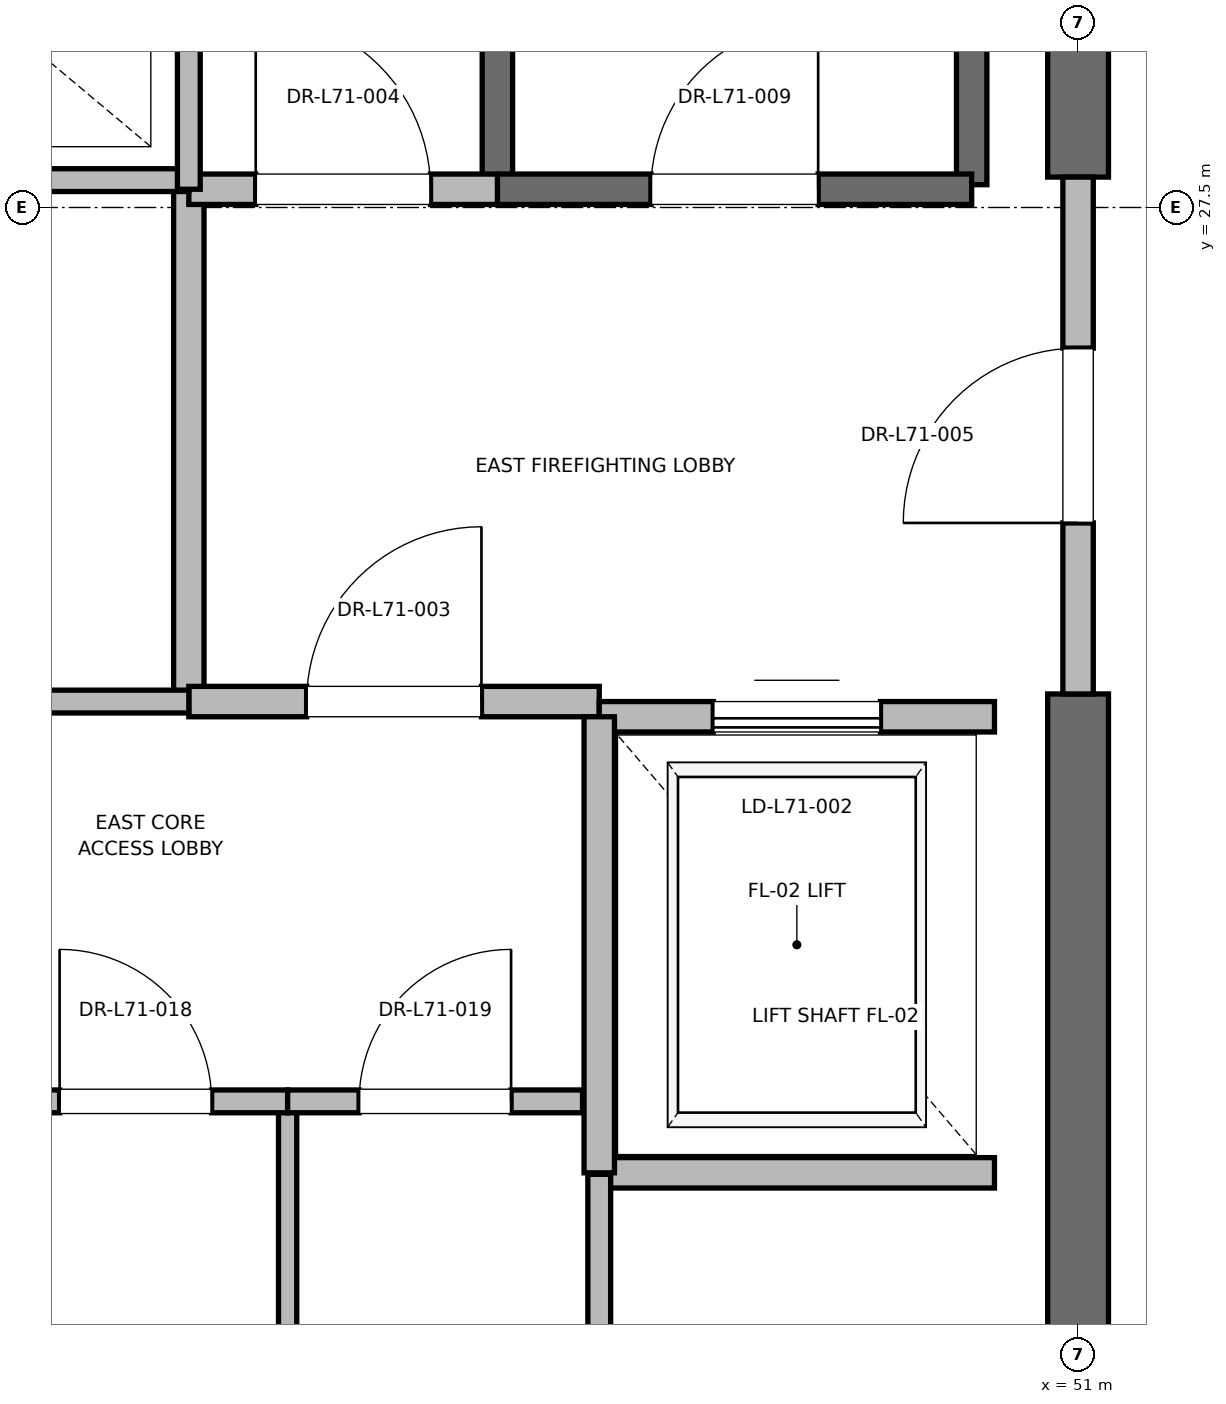
"""IFC4 building model, lengths in metres.
Left out: names, types, materials, properties, quantities, classifications, styles, units other than length and angle.
Written with IfcOpenShell. Run it as: python <this file> out.ifc"""

import sys

from ifc_helpers import new_model, si_unit, direction, frame, frame_2d, origin, place, context, subcontext, project, spatial, rectangle, extrude, element, fill, save


model = new_model("IFC4")
c1 = context("Model", 3, precision=1e-05, world=origin(), true_north=direction((0.0, 1.0)))
c2 = subcontext(c1, "Body", "Model", "MODEL_VIEW")
j1 = project(units=[si_unit("LENGTHUNIT", "METRE"), si_unit("PLANEANGLEUNIT", "RADIAN")], contexts=[c1])
p1 = place(None, origin())
s1 = spatial("IfcSite", under=j1, at=p1, CompositionType="ELEMENT")
p2 = place(p1, origin())
s2 = spatial("IfcBuilding", under=s1, at=p2, CompositionType="ELEMENT")
p3 = place(p2, frame((0.0, 0.0, 306.8)))
s3 = spatial("IfcBuildingStorey", under=s2, at=p3, CompositionType="ELEMENT", Elevation=306.8)
p4 = place(p3, frame((51.0, 18.5, 0.0), z_axis=(0.0, 0.0, 1.0), x_axis=(0.0, 1.0, 0.0)))
e1 = element("IfcWall", 1, at=p4, inside=s3, PredefinedType="SHEAR", context=c2, shape_type="SweptSolid", body=[
    extrude(rectangle(XDim=5.8, YDim=0.4, at=frame_2d((2.9, 0.0))), origin(), (0.0, 0.0, 1.0), 3.785),
])
p5 = place(p3, frame((51.0, 27.7, 0.0), z_axis=(0.0, 0.0, 1.0), x_axis=(0.0, 1.0, 0.0)))
e2 = element("IfcWall", 2, at=p5, inside=s3, PredefinedType="SHEAR", context=c2, shape_type="SweptSolid", body=[
    extrude(rectangle(XDim=8.8, YDim=0.4, at=frame_2d((4.4, 0.0))), origin(), (0.0, 0.0, 1.0), 3.785),
])
p6 = place(p3, frame((50.3, 27.65, 0.0), z_axis=(0.0, 0.0, 1.0), x_axis=(0.0, 1.0, 0.0)))
e3 = element("IfcWall", 3, at=p6, inside=s3, PredefinedType="SOLIDWALL", context=c2, shape_type="SweptSolid", body=[
    extrude(rectangle(XDim=8.15, YDim=0.2, at=frame_2d((4.075, 0.0))), origin(), (0.0, 0.0, 1.0), 3.785),
])
p7 = place(p3, frame((47.18, 27.62, 0.0), z_axis=(0.0, 0.0, 1.0), x_axis=(0.0, 1.0, 0.0)))
e4 = element("IfcWall", 4, at=p7, inside=s3, PredefinedType="SOLIDWALL", context=c2, shape_type="SweptSolid", body=[
    extrude(rectangle(XDim=8.18, YDim=0.2, at=frame_2d((4.09, 0.0))), origin(), (0.0, 0.0, 1.0), 3.785),
])
p8 = place(p3, frame((47.18, 27.62, 0.0), z_axis=(0.0, 0.0, 1.0), x_axis=(1.0, 0.0, 0.0)))
e5 = element("IfcWall", 5, at=p8, inside=s3, PredefinedType="SOLIDWALL", context=c2, shape_type="SweptSolid", body=[
    extrude(rectangle(XDim=3.12, YDim=0.2, at=frame_2d((1.56, 0.0))), origin(), (0.0, 0.0, 1.0), 3.785),
])
p9 = place(p8, frame((1.01, 0.0, 0.0)))
e6 = element("IfcOpeningElement", 6, at=p9, cuts=e5, PredefinedType="OPENING", context=c2, shape_type="SweptSolid", body=[
    extrude(rectangle(XDim=1.1, YDim=2.15, at=frame_2d((0.55, 1.075))), frame((0.0, 0.1, 0.0), z_axis=(0.0, -1.0, 0.0), x_axis=(1.0, 0.0, 0.0)), (0.0, 0.0, 1.0), 0.2),
])
p10 = place(p3, frame((45.15, 24.25, 0.0), z_axis=(0.0, 0.0, 1.0), x_axis=(0.0, 1.0, 0.0)))
e7 = element("IfcWall", 7, at=p10, inside=s3, PredefinedType="PARTITIONING", context=c2, shape_type="SweptSolid", body=[
    extrude(rectangle(XDim=3.37, YDim=0.2, at=frame_2d((1.685, 0.0))), origin(), (0.0, 0.0, 1.0), 3.785),
])
p11 = place(p3, frame((45.15, 24.25, 0.0), z_axis=(0.0, 0.0, 1.0), x_axis=(1.0, 0.0, 0.0)))
e8 = element("IfcWall", 8, at=p11, inside=s3, PredefinedType="PARTITIONING", context=c2, shape_type="SweptSolid", body=[
    extrude(rectangle(XDim=2.7, YDim=0.2, at=frame_2d((1.35, 0.0))), origin(), (0.0, 0.0, 1.0), 3.785),
])
p12 = place(p11, frame((0.775, 0.0, 0.0)))
e9 = element("IfcOpeningElement", 9, at=p12, cuts=e8, PredefinedType="OPENING", context=c2, shape_type="SweptSolid", body=[
    extrude(rectangle(XDim=1.15, YDim=2.2, at=frame_2d((0.575, 1.1))), frame((0.0, 0.1, 0.0), z_axis=(0.0, -1.0, 0.0), x_axis=(1.0, 0.0, 0.0)), (0.0, 0.0, 1.0), 0.2),
])
p13 = place(p3, frame((45.15, 27.62, 0.0), z_axis=(0.0, 0.0, 1.0), x_axis=(1.0, 0.0, 0.0)))
e10 = element("IfcWall", 10, at=p13, inside=s3, PredefinedType="PARTITIONING", context=c2, shape_type="SweptSolid", body=[
    extrude(rectangle(XDim=2.03, YDim=0.2, at=frame_2d((1.015, 0.0))), origin(), (0.0, 0.0, 1.0), 3.785),
])
p14 = place(p13, frame((0.44, 0.0, 0.0)))
e11 = element("IfcOpeningElement", 11, at=p14, cuts=e10, PredefinedType="OPENING", context=c2, shape_type="SweptSolid", body=[
    extrude(rectangle(XDim=1.15, YDim=2.2, at=frame_2d((0.575, 1.1))), frame((0.0, 0.1, 0.0), z_axis=(0.0, -1.0, 0.0), x_axis=(1.0, 0.0, 0.0)), (0.0, 0.0, 1.0), 0.2),
])
p15 = place(p3, frame((51.0, 24.3, 0.0), z_axis=(0.0, 0.0, 1.0), x_axis=(0.0, 1.0, 0.0)))
e12 = element("IfcWall", 12, at=p15, inside=s3, PredefinedType="PARTITIONING", context=c2, shape_type="SweptSolid", body=[
    extrude(rectangle(XDim=3.4, YDim=0.2, at=frame_2d((1.7, 0.0))), origin(), (0.0, 0.0, 1.0), 2.865),
])
p16 = place(p15, frame((1.125, 0.0, 0.0)))
e13 = element("IfcOpeningElement", 13, at=p16, cuts=e12, PredefinedType="OPENING", context=c2, shape_type="SweptSolid", body=[
    extrude(rectangle(XDim=1.15, YDim=2.2, at=frame_2d((0.575, 1.1))), frame((0.0, 0.1, 0.0), z_axis=(0.0, -1.0, 0.0), x_axis=(1.0, 0.0, 0.0)), (0.0, 0.0, 1.0), 0.2),
])
p17 = place(p3, frame((47.85, 21.15, 0.0), z_axis=(0.0, 0.0, 1.0), x_axis=(1.0, 0.0, 0.0)))
e14 = element("IfcWall", 14, at=p17, inside=s3, PredefinedType="SOLIDWALL", context=c2, shape_type="SweptSolid", body=[
    extrude(rectangle(XDim=2.6, YDim=0.2, at=frame_2d((1.3, 0.0))), origin(), (0.0, 0.0, 1.0), 3.785),
])
p18 = place(p3, frame((50.45, 24.15, 0.0), z_axis=(0.0, 0.0, 1.0), x_axis=(-1.0, 0.0, 0.0)))
e15 = element("IfcWall", 15, at=p18, inside=s3, PredefinedType="SOLIDWALL", context=c2, shape_type="SweptSolid", body=[
    extrude(rectangle(XDim=2.6, YDim=0.2, at=frame_2d((1.3, 0.0))), origin(), (0.0, 0.0, 1.0), 2.865),
])
p19 = place(p18, frame((0.75, 0.0, 0.0)))
e16 = element("IfcOpeningElement", 16, at=p19, cuts=e15, PredefinedType="OPENING", context=c2, shape_type="SweptSolid", body=[
    extrude(rectangle(XDim=1.1, YDim=2.2, at=frame_2d((0.55, 1.1))), frame((0.0, 0.1, 0.0), z_axis=(0.0, -1.0, 0.0), x_axis=(1.0, 0.0, 0.0)), (0.0, 0.0, 1.0), 0.2),
])
p20 = place(p3, frame((47.85, 24.15, 0.0), z_axis=(0.0, 0.0, 1.0), x_axis=(0.0, -1.0, 0.0)))
e17 = element("IfcWall", 17, at=p20, inside=s3, PredefinedType="SOLIDWALL", context=c2, shape_type="SweptSolid", body=[
    extrude(rectangle(XDim=3.0, YDim=0.2, at=frame_2d((1.5, 0.0))), origin(), (0.0, 0.0, 1.0), 3.785),
])
p21 = place(p3, frame((41.56, 27.68, 0.0), z_axis=(0.0, 0.0, 1.0), x_axis=(1.0, 0.0, 0.0)))
e18 = element("IfcWall", 18, at=p21, inside=s3, PredefinedType="PARTITIONING", context=c2, shape_type="SweptSolid", body=[
    extrude(rectangle(XDim=3.59, YDim=0.15, at=frame_2d((1.795, 0.0))), origin(), (0.0, 0.0, 1.0), 2.85),
])
p22 = place(p3, frame((47.85, 18.6, 0.0), z_axis=(0.0, 0.0, 1.0), x_axis=(0.0, 1.0, 0.0)))
e19 = element("IfcWall", 19, at=p22, inside=s3, PredefinedType="PARTITIONING", context=c2, shape_type="SweptSolid", body=[
    extrude(rectangle(XDim=2.54, YDim=0.15, at=frame_2d((1.27, 0.0))), origin(), (0.0, 0.0, 1.0), 2.85),
])
p23 = place(p3, frame((45.8, 18.6, 0.0), z_axis=(0.0, 0.0, 1.0), x_axis=(0.0, 1.0, 0.0)))
e20 = element("IfcWall", 20, at=p23, inside=s3, PredefinedType="PARTITIONING", context=c2, shape_type="SweptSolid", body=[
    extrude(rectangle(XDim=3.02, YDim=0.12, at=frame_2d((1.51, 0.0))), origin(), (0.0, 0.0, 1.0), 2.85),
])
p24 = place(p3, frame((43.8, 21.62, 0.0), z_axis=(0.0, 0.0, 1.0), x_axis=(1.0, 0.0, 0.0)))
e21 = element("IfcWall", 21, at=p24, inside=s3, PredefinedType="PARTITIONING", context=c2, shape_type="SweptSolid", body=[
    extrude(rectangle(XDim=2.0, YDim=0.15, at=frame_2d((1.0, 0.0))), origin(), (0.0, 0.0, 1.0), 2.85),
])
p25 = place(p24, frame((0.5, 0.0, 0.0)))
e22 = element("IfcOpeningElement", 22, at=p25, cuts=e21, PredefinedType="OPENING", context=c2, shape_type="SweptSolid", body=[
    extrude(rectangle(XDim=1.0, YDim=2.15, at=frame_2d((0.5, 1.075))), frame((0.0, 0.075, 0.0), z_axis=(0.0, -1.0, 0.0), x_axis=(1.0, 0.0, 0.0)), (0.0, 0.0, 1.0), 0.15),
])
p26 = place(p3, frame((45.8, 21.62, 0.0), z_axis=(0.0, 0.0, 1.0), x_axis=(1.0, 0.0, 0.0)))
e23 = element("IfcWall", 23, at=p26, inside=s3, PredefinedType="PARTITIONING", context=c2, shape_type="SweptSolid", body=[
    extrude(rectangle(XDim=1.94, YDim=0.15, at=frame_2d((0.97, 0.0))), origin(), (0.0, 0.0, 1.0), 2.85),
])
p27 = place(p26, frame((0.47, 0.0, 0.0)))
e24 = element("IfcOpeningElement", 24, at=p27, cuts=e23, PredefinedType="OPENING", context=c2, shape_type="SweptSolid", body=[
    extrude(rectangle(XDim=1.0, YDim=2.15, at=frame_2d((0.5, 1.075))), frame((0.0, 0.075, 0.0), z_axis=(0.0, -1.0, 0.0), x_axis=(1.0, 0.0, 0.0)), (0.0, 0.0, 1.0), 0.15),
])
p28 = place(p3, frame((41.76, 24.25, 0.0), z_axis=(0.0, 0.0, 1.0), x_axis=(1.0, 0.0, 0.0)))
e25 = element("IfcWall", 25, at=p28, inside=s3, PredefinedType="PARTITIONING", context=c2, shape_type="SweptSolid", body=[
    extrude(rectangle(XDim=3.39, YDim=0.15, at=frame_2d((1.695, 0.0))), origin(), (0.0, 0.0, 1.0), 2.85),
])
p29 = place(p28, frame((1.255, 0.0, 0.0)))
e26 = element("IfcOpeningElement", 26, at=p29, cuts=e25, PredefinedType="OPENING", context=c2, shape_type="SweptSolid", body=[
    extrude(rectangle(XDim=0.88, YDim=2.1, at=frame_2d((0.44, 1.05))), frame((0.0, 0.075, 0.0), z_axis=(0.0, -1.0, 0.0), x_axis=(1.0, 0.0, 0.0)), (0.0, 0.0, 1.0), 0.15),
])
p30 = place(p3, frame((45.15, 27.62, 0.0), z_axis=(0.0, 0.0, 1.0), x_axis=(0.0, 1.0, 0.0)))
e27 = element("IfcWall", 27, at=p30, inside=s3, PredefinedType="PARTITIONING", context=c2, shape_type="SweptSolid", body=[
    extrude(rectangle(XDim=3.1, YDim=0.15, at=frame_2d((1.55, 0.0))), origin(), (0.0, 0.0, 1.0), 2.85),
])
p31 = place(p9, origin())
e28 = element("IfcDoor", 28, at=p31, inside=s3, OperationType="SINGLE_SWING_RIGHT", PredefinedType="DOOR", context=c2, shape_type="SweptSolid", body=[
    extrude(rectangle(XDim=1.1, YDim=2.15, at=frame_2d((0.55, 1.075))), frame((0.0, 0.025, 0.0), z_axis=(0.0, -1.0, 0.0), x_axis=(1.0, 0.0, 0.0)), (0.0, 0.0, 1.0), 0.05),
])
fill(e6, e28)
p32 = place(p12, origin())
e29 = element("IfcDoor", 29, at=p32, inside=s3, OperationType="SINGLE_SWING_RIGHT", PredefinedType="DOOR", context=c2, shape_type="SweptSolid", body=[
    extrude(rectangle(XDim=1.15, YDim=2.2, at=frame_2d((0.575, 1.1))), frame((0.0, 0.025, 0.0), z_axis=(0.0, -1.0, 0.0), x_axis=(1.0, 0.0, 0.0)), (0.0, 0.0, 1.0), 0.05),
])
fill(e9, e29)
p33 = place(p14, origin())
e30 = element("IfcDoor", 30, at=p33, inside=s3, OperationType="SINGLE_SWING_LEFT", PredefinedType="DOOR", context=c2, shape_type="SweptSolid", body=[
    extrude(rectangle(XDim=1.15, YDim=2.2, at=frame_2d((0.575, 1.1))), frame((0.0, 0.025, 0.0), z_axis=(0.0, -1.0, 0.0), x_axis=(1.0, 0.0, 0.0)), (0.0, 0.0, 1.0), 0.05),
])
fill(e11, e30)
p34 = place(p16, origin())
e31 = element("IfcDoor", 31, at=p34, inside=s3, OperationType="SINGLE_SWING_LEFT", PredefinedType="DOOR", context=c2, shape_type="SweptSolid", body=[
    extrude(rectangle(XDim=1.15, YDim=2.2, at=frame_2d((0.575, 1.1))), frame((0.0, 0.025, 0.0), z_axis=(0.0, -1.0, 0.0), x_axis=(1.0, 0.0, 0.0)), (0.0, 0.0, 1.0), 0.05),
])
fill(e13, e31)
p35 = place(p19, origin())
e32 = element("IfcDoor", 32, at=p35, inside=s3, OperationType="SLIDING_TO_RIGHT", PredefinedType="DOOR", context=c2, shape_type="SweptSolid", body=[
    extrude(rectangle(XDim=1.1, YDim=2.2, at=frame_2d((0.55, 1.1))), frame((0.0, 0.025, 0.0), z_axis=(0.0, -1.0, 0.0), x_axis=(1.0, 0.0, 0.0)), (0.0, 0.0, 1.0), 0.05),
])
fill(e16, e32)
p36 = place(p25, origin())
e33 = element("IfcDoor", 33, at=p36, inside=s3, OperationType="SINGLE_SWING_LEFT", PredefinedType="DOOR", context=c2, shape_type="SweptSolid", body=[
    extrude(rectangle(XDim=1.0, YDim=2.15, at=frame_2d((0.5, 1.075))), frame((0.0, 0.025, 0.0), z_axis=(0.0, -1.0, 0.0), x_axis=(1.0, 0.0, 0.0)), (0.0, 0.0, 1.0), 0.05),
])
fill(e22, e33)
p37 = place(p27, origin())
e34 = element("IfcDoor", 34, at=p37, inside=s3, OperationType="SINGLE_SWING_RIGHT", PredefinedType="DOOR", context=c2, shape_type="SweptSolid", body=[
    extrude(rectangle(XDim=1.0, YDim=2.15, at=frame_2d((0.5, 1.075))), frame((0.0, 0.025, 0.0), z_axis=(0.0, -1.0, 0.0), x_axis=(1.0, 0.0, 0.0)), (0.0, 0.0, 1.0), 0.05),
])
fill(e24, e34)
save(model, sys.argv[1])
